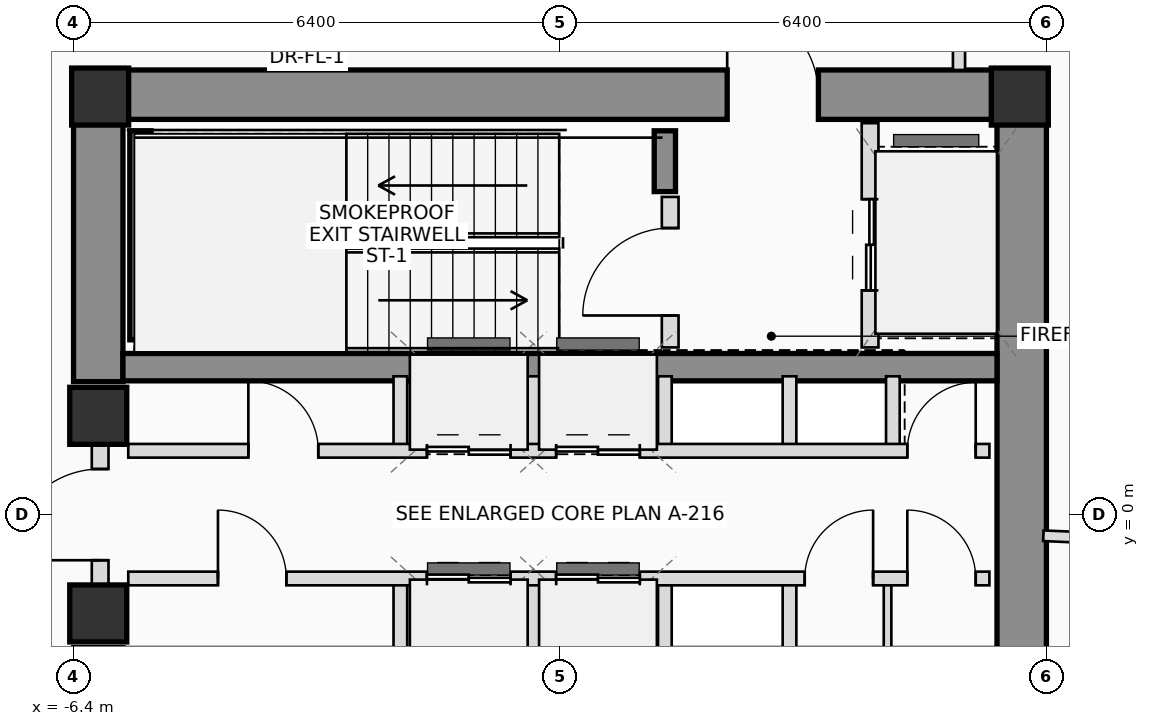
"""IFC4 building model, lengths in metres.
Left out: names, types, materials, properties, quantities, classifications, styles, units other than length and angle.
Written with IfcOpenShell. Run it as: python <this file> out.ifc"""

import sys

from ifc_helpers import new_model, si_unit, direction, frame, frame_2d, origin, origin_2d, place, context, subcontext, project, spatial, rectangle, extrude, source, transform, mapped, element, fill, save


model = new_model("IFC4")
c1 = context("Model", 3, precision=1e-05, world=origin(), true_north=direction((0.0, 1.0)))
c2 = subcontext(c1, "Body", "Model", "MODEL_VIEW")
j1 = project(units=[si_unit("LENGTHUNIT", "METRE"), si_unit("PLANEANGLEUNIT", "RADIAN")], contexts=[c1])
p1 = place(None, origin())
s1 = spatial("IfcSite", under=j1, at=p1, CompositionType="ELEMENT")
p2 = place(p1, origin())
s2 = spatial("IfcBuilding", under=s1, at=p2, CompositionType="ELEMENT")
p3 = place(p2, frame((0.0, 0.0, 169.1)))
s3 = spatial("IfcBuildingStorey", under=s2, at=p3, CompositionType="ELEMENT", Elevation=169.1)
m1 = source(origin(), c2, "Body", "SweptSolid", [
    extrude(rectangle(XDim=0.75, YDim=0.75, at=origin_2d()), origin(), (0.0, 0.0, 1.0), 3.45),
])
for number, where, z_axis, x_axis in (
    (1, (6.05, 5.5, 0.0), (0.0, 0.0, 1.0), (1.0, 0.0, 0.0)),
    (2, (-6.05, 5.5, 0.0), (0.0, 0.0, 1.0), (1.0, 0.0, 0.0)),
):
    element("IfcColumn", number, at=place(p3, frame(where, z_axis=z_axis, x_axis=x_axis)), inside=s3, PredefinedType="COLUMN", context=c2, shape_type="MappedRepresentation", body=[
        mapped(m1, transform((0.0, 0.0, 0.0), scale=1.0)),
    ])
p4 = place(p3, frame((-6.4, 5.525, 0.0), z_axis=(0.0, 0.0, 1.0), x_axis=(1.0, 0.0, 0.0)))
e3 = element("IfcWall", 3, at=p4, inside=s3, PredefinedType="SHEAR", context=c2, shape_type="SweptSolid", body=[
    extrude(rectangle(XDim=12.8, YDim=0.65, at=frame_2d((6.4, 0.0))), origin(), (0.0, 0.0, 1.0), 3.45),
])
p5 = place(p4, frame((8.6, 0.0, 0.0)))
e4 = element("IfcOpeningElement", 4, at=p5, cuts=e3, PredefinedType="OPENING", context=c2, shape_type="SweptSolid", body=[
    extrude(rectangle(XDim=1.2, YDim=2.2, at=frame_2d((0.6, 1.1))), frame((0.0, 0.335, 0.0), z_axis=(0.0, -1.0, 0.0), x_axis=(1.0, 0.0, 0.0)), (0.0, 0.0, 1.0), 0.67),
])
p6 = place(p3, frame((6.075, -5.2, 0.0), z_axis=(0.0, 0.0, 1.0), x_axis=(0.0, 1.0, 0.0)))
e5 = element("IfcWall", 5, at=p6, inside=s3, PredefinedType="SHEAR", context=c2, shape_type="SweptSolid", body=[
    extrude(rectangle(XDim=10.4, YDim=0.65, at=frame_2d((5.2, 0.0))), origin(), (0.0, 0.0, 1.0), 3.45),
])
p7 = place(p3, frame((-6.075, 1.75, 0.0), z_axis=(0.0, 0.0, 1.0), x_axis=(0.0, 1.0, 0.0)))
e6 = element("IfcWall", 6, at=p7, inside=s3, PredefinedType="SHEAR", context=c2, shape_type="SweptSolid", body=[
    extrude(rectangle(XDim=3.45, YDim=0.65, at=frame_2d((1.725, 0.0))), origin(), (0.0, 0.0, 1.0), 3.45),
])
p8 = place(p3, frame((-5.75, 1.94, 0.0), z_axis=(0.0, 0.0, 1.0), x_axis=(1.0, 0.0, 0.0)))
e7 = element("IfcWall", 7, at=p8, inside=s3, PredefinedType="SHEAR", context=c2, shape_type="SweptSolid", body=[
    extrude(rectangle(XDim=11.5, YDim=0.36, at=frame_2d((5.75, 0.0))), origin(), (0.0, 0.0, 1.0), 3.45),
])
p9 = place(p3, frame((-5.52, 2.3, 0.0), z_axis=(0.0, 0.0, 1.0), x_axis=(0.0, 1.0, 0.0)))
e8 = element("IfcWall", 8, at=p9, inside=s3, PredefinedType="SHEAR", context=c2, shape_type="SweptSolid", body=[
    extrude(rectangle(XDim=2.75, YDim=0.28, at=frame_2d((1.375, 0.0))), origin(), (0.0, 0.0, 1.0), 3.45),
])
p10 = place(p3, frame((1.38, 4.25, 0.0), z_axis=(0.0, 0.0, 1.0), x_axis=(0.0, 1.0, 0.0)))
e9 = element("IfcWall", 9, at=p10, inside=s3, PredefinedType="SHEAR", context=c2, shape_type="SweptSolid", body=[
    extrude(rectangle(XDim=0.8, YDim=0.28, at=frame_2d((0.4, 0.0))), origin(), (0.0, 0.0, 1.0), 3.45),
])
for number, where, z_axis, x_axis in (
    (10, (-6.075, -1.3, 0.0), (0.0, 0.0, 1.0), (1.0, 0.0, 0.0)),
    (11, (-6.075, 1.3, 0.0), (0.0, 0.0, 1.0), (1.0, 0.0, 0.0)),
):
    element("IfcColumn", number, at=place(p3, frame(where, z_axis=z_axis, x_axis=x_axis)), inside=s3, PredefinedType="COLUMN", context=c2, shape_type="MappedRepresentation", body=[
        mapped(m1, transform((0.0, 0.0, 0.0), scale=1.0)),
    ])
p11 = place(p3, frame((-6.05, -0.95, 0.0), z_axis=(0.0, 0.0, 1.0), x_axis=(0.0, 1.0, 0.0)))
e12 = element("IfcWall", 12, at=p11, inside=s3, PredefinedType="PLUMBINGWALL", context=c2, shape_type="SweptSolid", body=[
    extrude(rectangle(XDim=1.9, YDim=0.22, at=frame_2d((0.95, 0.0))), origin(), (0.0, 0.0, 1.0), 2.23),
])
p12 = place(p11, frame((0.35, 0.0, 0.0)))
e13 = element("IfcOpeningElement", 13, at=p12, cuts=e12, PredefinedType="OPENING", context=c2, shape_type="SweptSolid", body=[
    extrude(rectangle(XDim=1.2, YDim=2.2, at=frame_2d((0.6, 1.1))), frame((0.0, 0.12, 0.0), z_axis=(0.0, -1.0, 0.0), x_axis=(1.0, 0.0, 0.0)), (0.0, 0.0, 1.0), 0.24),
])
p13 = place(p3, frame((1.45, 2.2, 0.0), z_axis=(0.0, 0.0, 1.0), x_axis=(0.0, 1.0, 0.0)))
e14 = element("IfcWall", 14, at=p13, inside=s3, PredefinedType="PLUMBINGWALL", context=c2, shape_type="SweptSolid", body=[
    extrude(rectangle(XDim=1.98, YDim=0.22, at=frame_2d((0.99, 0.0))), origin(), (0.0, 0.0, 1.0), 3.25),
])
p14 = place(p13, frame((0.42, 0.0, 0.0)))
e15 = element("IfcOpeningElement", 15, at=p14, cuts=e14, PredefinedType="OPENING", context=c2, shape_type="SweptSolid", body=[
    extrude(rectangle(XDim=1.15, YDim=2.15, at=frame_2d((0.575, 1.075))), frame((0.0, 0.12, 0.0), z_axis=(0.0, -1.0, 0.0), x_axis=(1.0, 0.0, 0.0)), (0.0, 0.0, 1.0), 0.24),
])
p15 = place(p3, frame((4.08, 2.2, 0.0), z_axis=(0.0, 0.0, 1.0), x_axis=(0.0, 1.0, 0.0)))
e16 = element("IfcWall", 16, at=p15, inside=s3, PredefinedType="PLUMBINGWALL", context=c2, shape_type="SweptSolid", body=[
    extrude(rectangle(XDim=2.95, YDim=0.22, at=frame_2d((1.475, 0.0))), origin(), (0.0, 0.0, 1.0), 3.25),
])
p16 = place(p15, frame((0.75, 0.0, 0.0)))
e17 = element("IfcOpeningElement", 17, at=p16, cuts=e16, PredefinedType="OPENING", context=c2, shape_type="SweptSolid", body=[
    extrude(rectangle(XDim=1.2, YDim=2.25, at=frame_2d((0.6, 1.125))), frame((0.0, 0.12, 0.0), z_axis=(0.0, -1.0, 0.0), x_axis=(1.0, 0.0, 0.0)), (0.0, 0.0, 1.0), 0.24),
])
for number, where, z_axis, x_axis in (
    (18, (-2.1, 0.84, 0.0), (0.0, 0.0, 1.0), (0.0, 1.0, 0.0)),
    (19, (-2.1, -1.82, 0.0), (0.0, 0.0, 1.0), (0.0, 1.0, 0.0)),
    (20, (-0.35, 0.84, 0.0), (0.0, 0.0, 1.0), (0.0, 1.0, 0.0)),
    (21, (-0.35, -1.82, 0.0), (0.0, 0.0, 1.0), (0.0, 1.0, 0.0)),
    (22, (1.38, 0.84, 0.0), (0.0, 0.0, 1.0), (0.0, 1.0, 0.0)),
    (23, (1.38, -1.82, 0.0), (0.0, 0.0, 1.0), (0.0, 1.0, 0.0)),
    (24, (3.02, 0.84, 0.0), (0.0, 0.0, 1.0), (0.0, 1.0, 0.0)),
    (25, (4.38, 0.84, 0.0), (0.0, 0.0, 1.0), (0.0, 1.0, 0.0)),
    (26, (3.02, -1.82, 0.0), (0.0, 0.0, 1.0), (0.0, 1.0, 0.0)),
):
    element("IfcWall", number, at=place(p3, frame(where, z_axis=z_axis, x_axis=x_axis)), inside=s3, PredefinedType="PLUMBINGWALL", context=c2, shape_type="SweptSolid", body=[
        extrude(rectangle(XDim=0.98, YDim=0.18, at=frame_2d((0.49, 0.0))), origin(), (0.0, 0.0, 1.0), 3.25),
    ])
p17 = place(p3, frame((4.31, -1.82, 0.0), z_axis=(0.0, 0.0, 1.0), x_axis=(0.0, 1.0, 0.0)))
e27 = element("IfcWall", 27, at=p17, inside=s3, PredefinedType="PARTITIONING", context=c2, shape_type="SweptSolid", body=[
    extrude(rectangle(XDim=0.98, YDim=0.1, at=frame_2d((0.49, 0.0))), origin(), (0.0, 0.0, 1.0), 3.25),
])
p18 = place(p3, frame((-5.68, 0.84, 0.0), z_axis=(0.0, 0.0, 1.0), x_axis=(1.0, 0.0, 0.0)))
e28 = element("IfcWall", 28, at=p18, inside=s3, PredefinedType="PLUMBINGWALL", context=c2, shape_type="SweptSolid", body=[
    extrude(rectangle(XDim=11.33, YDim=0.18, at=frame_2d((5.665, 0.0))), origin(), (0.0, 0.0, 1.0), 3.25),
])
p19 = place(p18, frame((1.58, 0.0, 0.0)))
e29 = element("IfcOpeningElement", 29, at=p19, cuts=e28, PredefinedType="OPENING", context=c2, shape_type="SweptSolid", body=[
    extrude(rectangle(XDim=0.92, YDim=2.1, at=frame_2d((0.46, 1.05))), frame((0.0, 0.1, 0.0), z_axis=(0.0, -1.0, 0.0), x_axis=(1.0, 0.0, 0.0)), (0.0, 0.0, 1.0), 0.2),
])
p20 = place(p18, frame((3.93, 0.0, 0.0)))
e30 = element("IfcOpeningElement", 30, at=p20, cuts=e28, PredefinedType="OPENING", context=c2, shape_type="SweptSolid", body=[
    extrude(rectangle(XDim=1.1, YDim=2.2, at=frame_2d((0.55, 1.1))), frame((0.0, 0.1, 0.0), z_axis=(0.0, -1.0, 0.0), x_axis=(1.0, 0.0, 0.0)), (0.0, 0.0, 1.0), 0.2),
])
p21 = place(p18, frame((5.63, 0.0, 0.0)))
e31 = element("IfcOpeningElement", 31, at=p21, cuts=e28, PredefinedType="OPENING", context=c2, shape_type="SweptSolid", body=[
    extrude(rectangle(XDim=1.1, YDim=2.2, at=frame_2d((0.55, 1.1))), frame((0.0, 0.1, 0.0), z_axis=(0.0, -1.0, 0.0), x_axis=(1.0, 0.0, 0.0)), (0.0, 0.0, 1.0), 0.2),
])
p22 = place(p18, frame((10.25, 0.0, 0.0)))
e32 = element("IfcOpeningElement", 32, at=p22, cuts=e28, PredefinedType="OPENING", context=c2, shape_type="SweptSolid", body=[
    extrude(rectangle(XDim=0.9, YDim=2.05, at=frame_2d((0.45, 1.025))), frame((0.0, 0.1, 0.0), z_axis=(0.0, -1.0, 0.0), x_axis=(1.0, 0.0, 0.0)), (0.0, 0.0, 1.0), 0.2),
])
p23 = place(p3, frame((-5.68, -0.84, 0.0), z_axis=(0.0, 0.0, 1.0), x_axis=(1.0, 0.0, 0.0)))
e33 = element("IfcWall", 33, at=p23, inside=s3, PredefinedType="PLUMBINGWALL", context=c2, shape_type="SweptSolid", body=[
    extrude(rectangle(XDim=11.33, YDim=0.18, at=frame_2d((5.665, 0.0))), origin(), (0.0, 0.0, 1.0), 3.25),
])
p24 = place(p23, frame((1.18, 0.0, 0.0)))
e34 = element("IfcOpeningElement", 34, at=p24, cuts=e33, PredefinedType="OPENING", context=c2, shape_type="SweptSolid", body=[
    extrude(rectangle(XDim=0.9, YDim=2.05, at=frame_2d((0.45, 1.025))), frame((0.0, 0.1, 0.0), z_axis=(0.0, -1.0, 0.0), x_axis=(1.0, 0.0, 0.0)), (0.0, 0.0, 1.0), 0.2),
])
p25 = place(p23, frame((3.93, 0.0, 0.0)))
e35 = element("IfcOpeningElement", 35, at=p25, cuts=e33, PredefinedType="OPENING", context=c2, shape_type="SweptSolid", body=[
    extrude(rectangle(XDim=1.1, YDim=2.2, at=frame_2d((0.55, 1.1))), frame((0.0, 0.1, 0.0), z_axis=(0.0, -1.0, 0.0), x_axis=(1.0, 0.0, 0.0)), (0.0, 0.0, 1.0), 0.2),
])
p26 = place(p23, frame((5.63, 0.0, 0.0)))
e36 = element("IfcOpeningElement", 36, at=p26, cuts=e33, PredefinedType="OPENING", context=c2, shape_type="SweptSolid", body=[
    extrude(rectangle(XDim=1.1, YDim=2.2, at=frame_2d((0.55, 1.1))), frame((0.0, 0.1, 0.0), z_axis=(0.0, -1.0, 0.0), x_axis=(1.0, 0.0, 0.0)), (0.0, 0.0, 1.0), 0.2),
])
p27 = place(p23, frame((8.9, 0.0, 0.0)))
e37 = element("IfcOpeningElement", 37, at=p27, cuts=e33, PredefinedType="OPENING", context=c2, shape_type="SweptSolid", body=[
    extrude(rectangle(XDim=0.9, YDim=2.05, at=frame_2d((0.45, 1.025))), frame((0.0, 0.1, 0.0), z_axis=(0.0, -1.0, 0.0), x_axis=(1.0, 0.0, 0.0)), (0.0, 0.0, 1.0), 0.2),
])
p28 = place(p23, frame((10.25, 0.0, 0.0)))
e38 = element("IfcOpeningElement", 38, at=p28, cuts=e33, PredefinedType="OPENING", context=c2, shape_type="SweptSolid", body=[
    extrude(rectangle(XDim=0.9, YDim=2.05, at=frame_2d((0.45, 1.025))), frame((0.0, 0.1, 0.0), z_axis=(0.0, -1.0, 0.0), x_axis=(1.0, 0.0, 0.0)), (0.0, 0.0, 1.0), 0.2),
])
p29 = place(p3, frame((5.25, 7.55, 0.0), z_axis=(0.0, 0.0, 1.0), x_axis=(0.0, -1.0, 0.0)))
e39 = element("IfcWall", 39, at=p29, inside=s3, PredefinedType="PARTITIONING", context=c2, shape_type="SweptSolid", body=[
    extrude(rectangle(XDim=1.7, YDim=0.16, at=frame_2d((0.85, 0.0))), origin(), (0.0, 0.0, 1.0), 3.25),
])
p30 = place(p3, frame((6.36, -0.278, 0.0), z_axis=(0.0, 0.0, 1.0), x_axis=(0.999047983793, -0.043624833281, 0.0)))
e40 = element("IfcWall", 40, at=p30, inside=s3, PredefinedType="PARTITIONING", context=c2, shape_type="SweptSolid", body=[
    extrude(rectangle(XDim=6.833, YDim=0.14, at=frame_2d((3.417, 0.0))), origin(), (0.0, 0.0, 1.0), 2.605),
])
p31 = place(p5, origin())
e41 = element("IfcDoor", 41, at=p31, inside=s3, OperationType="SINGLE_SWING_LEFT", PredefinedType="DOOR", context=c2, shape_type="SweptSolid", body=[
    extrude(rectangle(XDim=1.2, YDim=2.2, at=frame_2d((0.6, 1.1))), frame((0.0, 0.025, 0.0), z_axis=(0.0, -1.0, 0.0), x_axis=(1.0, 0.0, 0.0)), (0.0, 0.0, 1.0), 0.05),
])
fill(e4, e41)
p32 = place(p12, origin())
e42 = element("IfcDoor", 42, at=p32, inside=s3, OperationType="SINGLE_SWING_LEFT", PredefinedType="DOOR", context=c2, shape_type="SweptSolid", body=[
    extrude(rectangle(XDim=1.2, YDim=2.2, at=frame_2d((0.6, 1.1))), frame((0.0, 0.025, 0.0), z_axis=(0.0, -1.0, 0.0), x_axis=(1.0, 0.0, 0.0)), (0.0, 0.0, 1.0), 0.05),
])
fill(e13, e42)
p33 = place(p14, origin())
e43 = element("IfcDoor", 43, at=p33, inside=s3, OperationType="SINGLE_SWING_LEFT", PredefinedType="DOOR", context=c2, shape_type="SweptSolid", body=[
    extrude(rectangle(XDim=1.15, YDim=2.15, at=frame_2d((0.575, 1.075))), frame((0.0, 0.025, 0.0), z_axis=(0.0, -1.0, 0.0), x_axis=(1.0, 0.0, 0.0)), (0.0, 0.0, 1.0), 0.05),
])
fill(e15, e43)
p34 = place(p16, origin())
e44 = element("IfcDoor", 44, at=p34, inside=s3, OperationType="DOUBLE_DOOR_SLIDING", PredefinedType="DOOR", context=c2, shape_type="SweptSolid", body=[
    extrude(rectangle(XDim=1.2, YDim=2.25, at=frame_2d((0.6, 1.125))), frame((0.0, 0.025, 0.0), z_axis=(0.0, -1.0, 0.0), x_axis=(1.0, 0.0, 0.0)), (0.0, 0.0, 1.0), 0.05),
])
fill(e17, e44)
p35 = place(p19, origin())
e45 = element("IfcDoor", 45, at=p35, inside=s3, OperationType="SINGLE_SWING_LEFT", PredefinedType="DOOR", context=c2, shape_type="SweptSolid", body=[
    extrude(rectangle(XDim=0.92, YDim=2.1, at=frame_2d((0.46, 1.05))), frame((0.0, 0.025, 0.0), z_axis=(0.0, -1.0, 0.0), x_axis=(1.0, 0.0, 0.0)), (0.0, 0.0, 1.0), 0.05),
])
fill(e29, e45)
p36 = place(p20, origin())
e46 = element("IfcDoor", 46, at=p36, inside=s3, OperationType="DOUBLE_DOOR_SLIDING", PredefinedType="DOOR", context=c2, shape_type="SweptSolid", body=[
    extrude(rectangle(XDim=1.1, YDim=2.2, at=frame_2d((0.55, 1.1))), frame((0.0, 0.025, 0.0), z_axis=(0.0, -1.0, 0.0), x_axis=(1.0, 0.0, 0.0)), (0.0, 0.0, 1.0), 0.05),
])
fill(e30, e46)
p37 = place(p21, origin())
e47 = element("IfcDoor", 47, at=p37, inside=s3, OperationType="DOUBLE_DOOR_SLIDING", PredefinedType="DOOR", context=c2, shape_type="SweptSolid", body=[
    extrude(rectangle(XDim=1.1, YDim=2.2, at=frame_2d((0.55, 1.1))), frame((0.0, 0.025, 0.0), z_axis=(0.0, -1.0, 0.0), x_axis=(1.0, 0.0, 0.0)), (0.0, 0.0, 1.0), 0.05),
])
fill(e31, e47)
p38 = place(p22, origin())
e48 = element("IfcDoor", 48, at=p38, inside=s3, OperationType="SINGLE_SWING_RIGHT", PredefinedType="DOOR", context=c2, shape_type="SweptSolid", body=[
    extrude(rectangle(XDim=0.9, YDim=2.05, at=frame_2d((0.45, 1.025))), frame((0.0, 0.025, 0.0), z_axis=(0.0, -1.0, 0.0), x_axis=(1.0, 0.0, 0.0)), (0.0, 0.0, 1.0), 0.05),
])
fill(e32, e48)
p39 = place(p24, origin())
e49 = element("IfcDoor", 49, at=p39, inside=s3, OperationType="SINGLE_SWING_LEFT", PredefinedType="DOOR", context=c2, shape_type="SweptSolid", body=[
    extrude(rectangle(XDim=0.9, YDim=2.05, at=frame_2d((0.45, 1.025))), frame((0.0, 0.025, 0.0), z_axis=(0.0, -1.0, 0.0), x_axis=(1.0, 0.0, 0.0)), (0.0, 0.0, 1.0), 0.05),
])
fill(e34, e49)
p40 = place(p25, origin())
e50 = element("IfcDoor", 50, at=p40, inside=s3, OperationType="DOUBLE_DOOR_SLIDING", PredefinedType="DOOR", context=c2, shape_type="SweptSolid", body=[
    extrude(rectangle(XDim=1.1, YDim=2.2, at=frame_2d((0.55, 1.1))), frame((0.0, 0.025, 0.0), z_axis=(0.0, -1.0, 0.0), x_axis=(1.0, 0.0, 0.0)), (0.0, 0.0, 1.0), 0.05),
])
fill(e35, e50)
p41 = place(p26, origin())
e51 = element("IfcDoor", 51, at=p41, inside=s3, OperationType="DOUBLE_DOOR_SLIDING", PredefinedType="DOOR", context=c2, shape_type="SweptSolid", body=[
    extrude(rectangle(XDim=1.1, YDim=2.2, at=frame_2d((0.55, 1.1))), frame((0.0, 0.025, 0.0), z_axis=(0.0, -1.0, 0.0), x_axis=(1.0, 0.0, 0.0)), (0.0, 0.0, 1.0), 0.05),
])
fill(e36, e51)
p42 = place(p27, origin())
e52 = element("IfcDoor", 52, at=p42, inside=s3, OperationType="SINGLE_SWING_RIGHT", PredefinedType="DOOR", context=c2, shape_type="SweptSolid", body=[
    extrude(rectangle(XDim=0.9, YDim=2.05, at=frame_2d((0.45, 1.025))), frame((0.0, 0.025, 0.0), z_axis=(0.0, -1.0, 0.0), x_axis=(1.0, 0.0, 0.0)), (0.0, 0.0, 1.0), 0.05),
])
fill(e37, e52)
p43 = place(p28, origin())
e53 = element("IfcDoor", 53, at=p43, inside=s3, OperationType="SINGLE_SWING_LEFT", PredefinedType="DOOR", context=c2, shape_type="SweptSolid", body=[
    extrude(rectangle(XDim=0.9, YDim=2.05, at=frame_2d((0.45, 1.025))), frame((0.0, 0.025, 0.0), z_axis=(0.0, -1.0, 0.0), x_axis=(1.0, 0.0, 0.0)), (0.0, 0.0, 1.0), 0.05),
])
fill(e38, e53)
save(model, sys.argv[1])
